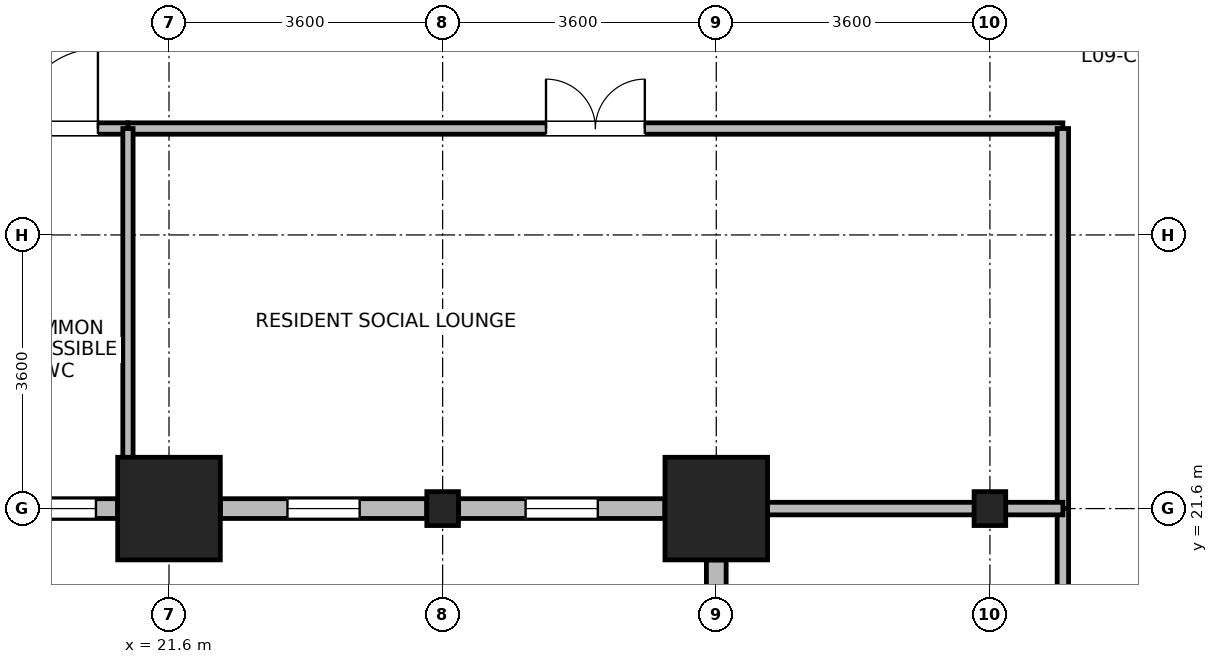
"""IFC4 building model, lengths in metres.
Left out: names, types, materials, properties, quantities, classifications, styles, units other than length and angle.
Written with IfcOpenShell. Run it as: python <this file> out.ifc"""

import sys

from ifc_helpers import new_model, si_unit, direction, frame, frame_2d, origin, origin_2d, place, context, subcontext, project, spatial, rectangle, i_section, extrude, source, transform, mapped, element, fill, save


model = new_model("IFC4")
c1 = context("Model", 3, precision=1e-05, world=origin(), true_north=direction((0.0, 1.0)))
c2 = subcontext(c1, "Body", "Model", "MODEL_VIEW")
j1 = project(units=[si_unit("LENGTHUNIT", "METRE"), si_unit("PLANEANGLEUNIT", "RADIAN")], contexts=[c1])
p1 = place(None, origin())
s1 = spatial("IfcSite", under=j1, at=p1, CompositionType="ELEMENT")
p2 = place(p1, origin())
s2 = spatial("IfcBuilding", under=s1, at=p2, CompositionType="ELEMENT")
p3 = place(p2, frame((0.0, 0.0, 40.1)))
s3 = spatial("IfcBuildingStorey", under=s2, at=p3, CompositionType="ELEMENT", Elevation=40.1)
m1 = source(origin(), c2, "Body", "SweptSolid", [
    extrude(rectangle(XDim=1.35, YDim=1.35, at=origin_2d()), origin(), (0.0, 0.0, 1.0), 3.7),
])
for number, where, z_axis, x_axis in (
    (1, (21.6, 21.6, 0.0), (0.0, 0.0, 1.0), (1.0, 0.0, 0.0)),
    (2, (28.8, 21.6, 0.0), (0.0, 0.0, 1.0), (1.0, 0.0, 0.0)),
):
    element("IfcColumn", number, at=place(p3, frame(where, z_axis=z_axis, x_axis=x_axis)), inside=s3, PredefinedType="COLUMN", context=c2, shape_type="MappedRepresentation", body=[
        mapped(m1, transform((0.0, 0.0, 0.0), x_axis=(1.0, 0.0, 0.0), y_axis=(0.0, 1.0, 0.0), z_axis=(0.0, 0.0, 1.0), scale=1.0)),
    ])
m2 = source(origin(), c2, "Body", "SweptSolid", [
    extrude(i_section(OverallWidth=0.416, OverallDepth=0.446, WebThickness=0.029, FlangeThickness=0.04, FilletRadius=0.015, at=origin_2d()), origin(), (0.0, 0.0, 1.0), 3.7),
])
for number, where, z_axis, x_axis in (
    (3, (25.2, 21.6, 0.0), (0.0, 0.0, 1.0), (1.0, 0.0, 0.0)),
    (4, (32.4, 21.6, 0.0), (0.0, 0.0, 1.0), (1.0, 0.0, 0.0)),
):
    element("IfcColumn", number, at=place(p3, frame(where, z_axis=z_axis, x_axis=x_axis)), inside=s3, PredefinedType="COLUMN", context=c2, shape_type="MappedRepresentation", body=[
        mapped(m2, transform((0.0, 0.0, 0.0), x_axis=(1.0, 0.0, 0.0), y_axis=(0.0, 1.0, 0.0), z_axis=(0.0, 0.0, 1.0), scale=1.0)),
    ])
p4 = place(p3, frame((20.924, 21.6, 0.0), z_axis=(0.0, 0.0, 1.0), x_axis=(-1.0, 0.0, 0.0)))
e5 = element("IfcWall", 5, at=p4, inside=s3, PredefinedType="STANDARD", context=c2, shape_type="SweptSolid", body=[
    extrude(rectangle(XDim=2.715, YDim=0.26, at=frame_2d((1.357, 0.0))), origin(), (0.0, 0.0, 1.0), 2.93),
])
p5 = place(p4, frame((0.285, 0.0, 0.85)))
e6 = element("IfcOpeningElement", 6, at=p5, cuts=e5, PredefinedType="OPENING", context=c2, shape_type="SweptSolid", body=[
    extrude(rectangle(XDim=0.95, YDim=1.75, at=frame_2d((0.475, 0.875))), frame((0.0, 0.14, 0.0), z_axis=(0.0, -1.0, 0.0), x_axis=(1.0, 0.0, 0.0)), (0.0, 0.0, 1.0), 0.28),
])
p6 = place(p3, frame((24.991, 21.6, 0.0), z_axis=(0.0, 0.0, 1.0), x_axis=(-1.0, 0.0, 0.0)))
e7 = element("IfcWall", 7, at=p6, inside=s3, PredefinedType="STANDARD", context=c2, shape_type="SweptSolid", body=[
    extrude(rectangle(XDim=2.715, YDim=0.26, at=frame_2d((1.357, 0.0))), origin(), (0.0, 0.0, 1.0), 2.93),
])
p7 = place(p6, frame((0.883, 0.0, 0.85)))
e8 = element("IfcOpeningElement", 8, at=p7, cuts=e7, PredefinedType="OPENING", context=c2, shape_type="SweptSolid", body=[
    extrude(rectangle(XDim=0.95, YDim=1.75, at=frame_2d((0.475, 0.875))), frame((0.0, 0.14, 0.0), z_axis=(0.0, -1.0, 0.0), x_axis=(1.0, 0.0, 0.0)), (0.0, 0.0, 1.0), 0.28),
])
p8 = place(p3, frame((28.124, 21.6, 0.0), z_axis=(0.0, 0.0, 1.0), x_axis=(-1.0, 0.0, 0.0)))
e9 = element("IfcWall", 9, at=p8, inside=s3, PredefinedType="STANDARD", context=c2, shape_type="SweptSolid", body=[
    extrude(rectangle(XDim=2.715, YDim=0.26, at=frame_2d((1.357, 0.0))), origin(), (0.0, 0.0, 1.0), 2.93),
])
p9 = place(p8, frame((0.883, 0.0, 0.85)))
e10 = element("IfcOpeningElement", 10, at=p9, cuts=e9, PredefinedType="OPENING", context=c2, shape_type="SweptSolid", body=[
    extrude(rectangle(XDim=0.95, YDim=1.75, at=frame_2d((0.475, 0.875))), frame((0.0, 0.14, 0.0), z_axis=(0.0, -1.0, 0.0), x_axis=(1.0, 0.0, 0.0)), (0.0, 0.0, 1.0), 0.28),
])
p10 = place(p3, frame((28.8, 1.67, 0.0), z_axis=(0.0, 0.0, 1.0), x_axis=(0.0, 1.0, 0.0)))
e11 = element("IfcWall", 11, at=p10, inside=s3, PredefinedType="STANDARD", context=c2, shape_type="SweptSolid", body=[
    extrude(rectangle(XDim=19.254, YDim=0.26, at=frame_2d((9.627, 0.0))), origin(), (0.0, 0.0, 1.0), 3.43),
])
p11 = place(p10, frame((0.705, 0.0, 0.85)))
e12 = element("IfcOpeningElement", 12, at=p11, cuts=e11, PredefinedType="OPENING", context=c2, shape_type="SweptSolid", body=[
    extrude(rectangle(XDim=1.8, YDim=1.85, at=frame_2d((0.9, 0.925))), frame((0.0, 0.14, 0.0), z_axis=(0.0, -1.0, 0.0), x_axis=(1.0, 0.0, 0.0)), (0.0, 0.0, 1.0), 0.28),
])
p12 = place(p10, frame((7.123, 0.0, 0.85)))
e13 = element("IfcOpeningElement", 13, at=p12, cuts=e11, PredefinedType="OPENING", context=c2, shape_type="SweptSolid", body=[
    extrude(rectangle(XDim=1.8, YDim=1.85, at=frame_2d((0.9, 0.925))), frame((0.0, 0.14, 0.0), z_axis=(0.0, -1.0, 0.0), x_axis=(1.0, 0.0, 0.0)), (0.0, 0.0, 1.0), 0.28),
])
p13 = place(p10, frame((10.332, 0.0, 0.85)))
e14 = element("IfcOpeningElement", 14, at=p13, cuts=e11, PredefinedType="OPENING", context=c2, shape_type="SweptSolid", body=[
    extrude(rectangle(XDim=1.8, YDim=1.85, at=frame_2d((0.9, 0.925))), frame((0.0, 0.14, 0.0), z_axis=(0.0, -1.0, 0.0), x_axis=(1.0, 0.0, 0.0)), (0.0, 0.0, 1.0), 0.28),
])
p14 = place(p10, frame((13.541, 0.0, 0.85)))
e15 = element("IfcOpeningElement", 15, at=p14, cuts=e11, PredefinedType="OPENING", context=c2, shape_type="SweptSolid", body=[
    extrude(rectangle(XDim=1.8, YDim=1.85, at=frame_2d((0.9, 0.925))), frame((0.0, 0.14, 0.0), z_axis=(0.0, -1.0, 0.0), x_axis=(1.0, 0.0, 0.0)), (0.0, 0.0, 1.0), 0.28),
])
p15 = place(p10, frame((16.75, 0.0, 0.85)))
e16 = element("IfcOpeningElement", 16, at=p15, cuts=e11, PredefinedType="OPENING", context=c2, shape_type="SweptSolid", body=[
    extrude(rectangle(XDim=1.8, YDim=1.85, at=frame_2d((0.9, 0.925))), frame((0.0, 0.14, 0.0), z_axis=(0.0, -1.0, 0.0), x_axis=(1.0, 0.0, 0.0)), (0.0, 0.0, 1.0), 0.28),
])
p16 = place(p3, frame((21.06, 26.6, 0.0), z_axis=(0.0, 0.0, 1.0), x_axis=(1.0, 0.0, 0.0)))
e17 = element("IfcWall", 17, at=p16, inside=s3, PredefinedType="PARTITIONING", context=c2, shape_type="SweptSolid", body=[
    extrude(rectangle(XDim=12.3, YDim=0.15, at=frame_2d((6.15, 0.0))), origin(), (0.0, 0.0, 1.0), 3.43),
])
p17 = place(p16, frame((5.5, 0.0, 0.0)))
e18 = element("IfcOpeningElement", 18, at=p17, cuts=e17, PredefinedType="OPENING", context=c2, shape_type="SweptSolid", body=[
    extrude(rectangle(XDim=1.3, YDim=2.12, at=frame_2d((0.65, 1.06))), frame((0.0, 0.085, 0.0), z_axis=(0.0, -1.0, 0.0), x_axis=(1.0, 0.0, 0.0)), (0.0, 0.0, 1.0), 0.17),
])
p18 = place(p3, frame((33.36, 14.5, 0.0), z_axis=(0.0, 0.0, 1.0), x_axis=(0.0, 1.0, 0.0)))
e19 = element("IfcWall", 19, at=p18, inside=s3, PredefinedType="PARTITIONING", context=c2, shape_type="SweptSolid", body=[
    extrude(rectangle(XDim=7.1, YDim=0.15, at=frame_2d((3.55, 0.0))), origin(), (0.0, 0.0, 1.0), 3.43),
])
p19 = place(p18, frame((2.9, 0.0, 0.0)))
e20 = element("IfcOpeningElement", 20, at=p19, cuts=e19, PredefinedType="OPENING", context=c2, shape_type="SweptSolid", body=[
    extrude(rectangle(XDim=1.3, YDim=2.12, at=frame_2d((0.65, 1.06))), frame((0.0, 0.085, 0.0), z_axis=(0.0, -1.0, 0.0), x_axis=(1.0, 0.0, 0.0)), (0.0, 0.0, 1.0), 0.17),
])
p20 = place(p3, frame((33.36, 21.6, 0.0), z_axis=(0.0, 0.0, 1.0), x_axis=(0.0, 1.0, 0.0)))
e21 = element("IfcWall", 21, at=p20, inside=s3, PredefinedType="PARTITIONING", context=c2, shape_type="SweptSolid", body=[
    extrude(rectangle(XDim=5.0, YDim=0.15, at=frame_2d((2.5, 0.0))), origin(), (0.0, 0.0, 1.0), 3.43),
])
p21 = place(p3, frame((19.22, 26.6, 0.0), z_axis=(0.0, 0.0, 1.0), x_axis=(1.0, 0.0, 0.0)))
e22 = element("IfcWall", 22, at=p21, inside=s3, PredefinedType="PARTITIONING", context=c2, shape_type="SweptSolid", body=[
    extrude(rectangle(XDim=1.84, YDim=0.15, at=frame_2d((0.92, 0.0))), origin(), (0.0, 0.0, 1.0), 3.43),
])
p22 = place(p21, frame((0.395, 0.0, 0.0)))
e23 = element("IfcOpeningElement", 23, at=p22, cuts=e22, PredefinedType="OPENING", context=c2, shape_type="SweptSolid", body=[
    extrude(rectangle(XDim=1.05, YDim=2.12, at=frame_2d((0.525, 1.06))), frame((0.0, 0.085, 0.0), z_axis=(0.0, -1.0, 0.0), x_axis=(1.0, 0.0, 0.0)), (0.0, 0.0, 1.0), 0.17),
])
p23 = place(p3, frame((21.06, 21.732, 0.0), z_axis=(0.0, 0.0, 1.0), x_axis=(0.0, 1.0, 0.0)))
e24 = element("IfcWall", 24, at=p23, inside=s3, PredefinedType="PARTITIONING", context=c2, shape_type="SweptSolid", body=[
    extrude(rectangle(XDim=4.868, YDim=0.135, at=frame_2d((2.434, 0.0))), origin(), (0.0, 0.0, 1.0), 3.43),
])
p24 = place(p3, frame((28.932, 21.6, 0.0), z_axis=(0.0, 0.0, 1.0), x_axis=(1.0, 0.0, 0.0)))
e25 = element("IfcWall", 25, at=p24, inside=s3, PredefinedType="PARTITIONING", context=c2, shape_type="SweptSolid", body=[
    extrude(rectangle(XDim=4.428, YDim=0.165, at=frame_2d((2.214, 0.0))), origin(), (0.0, 0.0, 1.0), 2.93),
])
p25 = place(p5, origin())
e26 = element("IfcWindow", 26, at=p25, inside=s3, PartitioningType="SINGLE_PANEL", PredefinedType="WINDOW", context=c2, shape_type="SweptSolid", body=[
    extrude(rectangle(XDim=0.95, YDim=1.75, at=frame_2d((0.475, 0.875))), frame((0.0, 0.03, 0.0), z_axis=(0.0, -1.0, 0.0), x_axis=(1.0, 0.0, 0.0)), (0.0, 0.0, 1.0), 0.06),
])
fill(e6, e26)
p26 = place(p7, origin())
e27 = element("IfcWindow", 27, at=p26, inside=s3, PartitioningType="SINGLE_PANEL", PredefinedType="WINDOW", context=c2, shape_type="SweptSolid", body=[
    extrude(rectangle(XDim=0.95, YDim=1.75, at=frame_2d((0.475, 0.875))), frame((0.0, 0.03, 0.0), z_axis=(0.0, -1.0, 0.0), x_axis=(1.0, 0.0, 0.0)), (0.0, 0.0, 1.0), 0.06),
])
fill(e8, e27)
p27 = place(p9, origin())
e28 = element("IfcWindow", 28, at=p27, inside=s3, PartitioningType="SINGLE_PANEL", PredefinedType="WINDOW", context=c2, shape_type="SweptSolid", body=[
    extrude(rectangle(XDim=0.95, YDim=1.75, at=frame_2d((0.475, 0.875))), frame((0.0, 0.03, 0.0), z_axis=(0.0, -1.0, 0.0), x_axis=(1.0, 0.0, 0.0)), (0.0, 0.0, 1.0), 0.06),
])
fill(e10, e28)
p28 = place(p17, origin())
e29 = element("IfcDoor", 29, at=p28, inside=s3, OperationType="DOUBLE_DOOR_SINGLE_SWING", PredefinedType="DOOR", context=c2, shape_type="SweptSolid", body=[
    extrude(rectangle(XDim=1.3, YDim=2.12, at=frame_2d((0.65, 1.06))), frame((0.0, 0.025, 0.0), z_axis=(0.0, -1.0, 0.0), x_axis=(1.0, 0.0, 0.0)), (0.0, 0.0, 1.0), 0.05),
])
fill(e18, e29)
p29 = place(p22, origin())
e30 = element("IfcDoor", 30, at=p29, inside=s3, OperationType="SINGLE_SWING_RIGHT", PredefinedType="DOOR", context=c2, shape_type="SweptSolid", body=[
    extrude(rectangle(XDim=1.05, YDim=2.12, at=frame_2d((0.525, 1.06))), frame((0.0, 0.025, 0.0), z_axis=(0.0, -1.0, 0.0), x_axis=(1.0, 0.0, 0.0)), (0.0, 0.0, 1.0), 0.05),
])
fill(e23, e30)
save(model, sys.argv[1])
